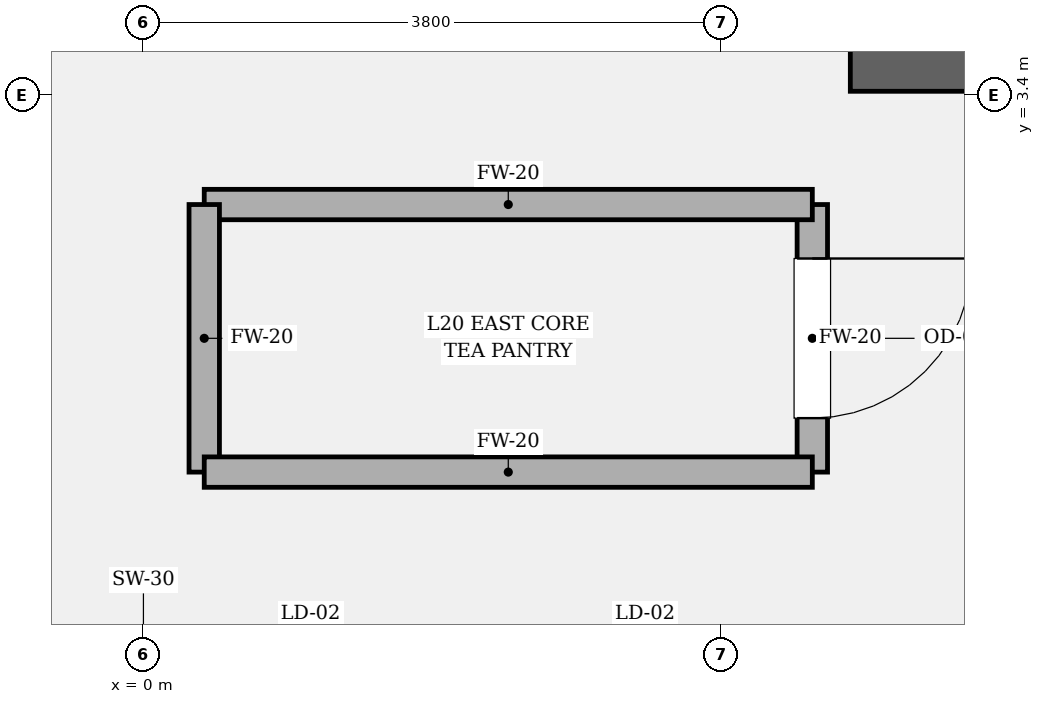
"""IFC4 building model, lengths in metres.
Left out: names, types, materials, properties, quantities, classifications, styles, units other than length and angle.
Written with IfcOpenShell. Run it as: python <this file> out.ifc"""

import sys

from ifc_helpers import new_model, si_unit, direction, frame, frame_2d, origin, place, context, subcontext, project, spatial, rectangle, extrude, element, fill, save


model = new_model("IFC4")
c1 = context("Model", 3, precision=1e-05, world=origin(), true_north=direction((0.0, 1.0)))
c2 = subcontext(c1, "Body", "Model", "MODEL_VIEW")
j1 = project(units=[si_unit("LENGTHUNIT", "METRE"), si_unit("PLANEANGLEUNIT", "RADIAN")], contexts=[c1])
p1 = place(None, origin())
s1 = spatial("IfcSite", under=j1, at=p1, CompositionType="ELEMENT")
p2 = place(p1, origin())
s2 = spatial("IfcBuilding", under=s1, at=p2, CompositionType="ELEMENT")
p3 = place(p2, frame((0.0, 0.0, 88.95)))
s3 = spatial("IfcBuildingStorey", under=s2, at=p3, CompositionType="ELEMENT", Elevation=88.95)
p4 = place(p3, frame((4.65, 3.6, 0.0), z_axis=(0.0, 0.0, 1.0), x_axis=(1.0, 0.0, 0.0)))
e1 = element("IfcWall", 1, at=p4, inside=s3, PredefinedType="SOLIDWALL", context=c2, shape_type="SweptSolid", body=[
    extrude(rectangle(XDim=5.175, YDim=0.35, at=frame_2d((2.587, 0.0))), origin(), (0.0, 0.0, 1.0), 4.05),
])
p5 = place(p3, frame((4.4, 0.92, 0.0), z_axis=(0.0, 0.0, 1.0), x_axis=(0.0, 1.0, 0.0)))
e2 = element("IfcWall", 2, at=p5, inside=s3, PredefinedType="SOLIDWALL", context=c2, shape_type="SweptSolid", body=[
    extrude(rectangle(XDim=1.76, YDim=0.2, at=frame_2d((0.88, 0.0))), origin(), (0.0, 0.0, 1.0), 3.77),
])
p6 = place(p5, frame((0.355, 0.0, 0.0)))
e3 = element("IfcOpeningElement", 3, at=p6, cuts=e2, PredefinedType="OPENING", context=c2, shape_type="SweptSolid", body=[
    extrude(rectangle(XDim=1.05, YDim=2.2, at=frame_2d((0.525, 1.1))), frame((0.0, 0.11, 0.0), z_axis=(0.0, -1.0, 0.0), x_axis=(1.0, 0.0, 0.0)), (0.0, 0.0, 1.0), 0.22),
])
p7 = place(p3, frame((4.4, 2.68, 0.0), z_axis=(0.0, 0.0, 1.0), x_axis=(-1.0, 0.0, 0.0)))
e4 = element("IfcWall", 4, at=p7, inside=s3, PredefinedType="SOLIDWALL", context=c2, shape_type="SweptSolid", body=[
    extrude(rectangle(XDim=4.0, YDim=0.2, at=frame_2d((2.0, 0.0))), origin(), (0.0, 0.0, 1.0), 3.77),
])
p8 = place(p3, frame((0.4, 2.68, 0.0), z_axis=(0.0, 0.0, 1.0), x_axis=(0.0, -1.0, 0.0)))
e5 = element("IfcWall", 5, at=p8, inside=s3, PredefinedType="SOLIDWALL", context=c2, shape_type="SweptSolid", body=[
    extrude(rectangle(XDim=1.76, YDim=0.2, at=frame_2d((0.88, 0.0))), origin(), (0.0, 0.0, 1.0), 3.77),
])
p9 = place(p3, frame((0.4, 0.92, 0.0), z_axis=(0.0, 0.0, 1.0), x_axis=(1.0, 0.0, 0.0)))
e6 = element("IfcWall", 6, at=p9, inside=s3, PredefinedType="SOLIDWALL", context=c2, shape_type="SweptSolid", body=[
    extrude(rectangle(XDim=4.0, YDim=0.2, at=frame_2d((2.0, 0.0))), origin(), (0.0, 0.0, 1.0), 3.77),
])
p10 = place(p6, origin())
e7 = element("IfcDoor", 7, at=p10, inside=s3, OperationType="SINGLE_SWING_RIGHT", PredefinedType="DOOR", context=c2, shape_type="SweptSolid", body=[
    extrude(rectangle(XDim=1.05, YDim=2.2, at=frame_2d((0.525, 1.1))), frame((0.0, 0.025, 0.0), z_axis=(0.0, -1.0, 0.0), x_axis=(1.0, 0.0, 0.0)), (0.0, 0.0, 1.0), 0.05),
])
fill(e3, e7)
save(model, sys.argv[1])
